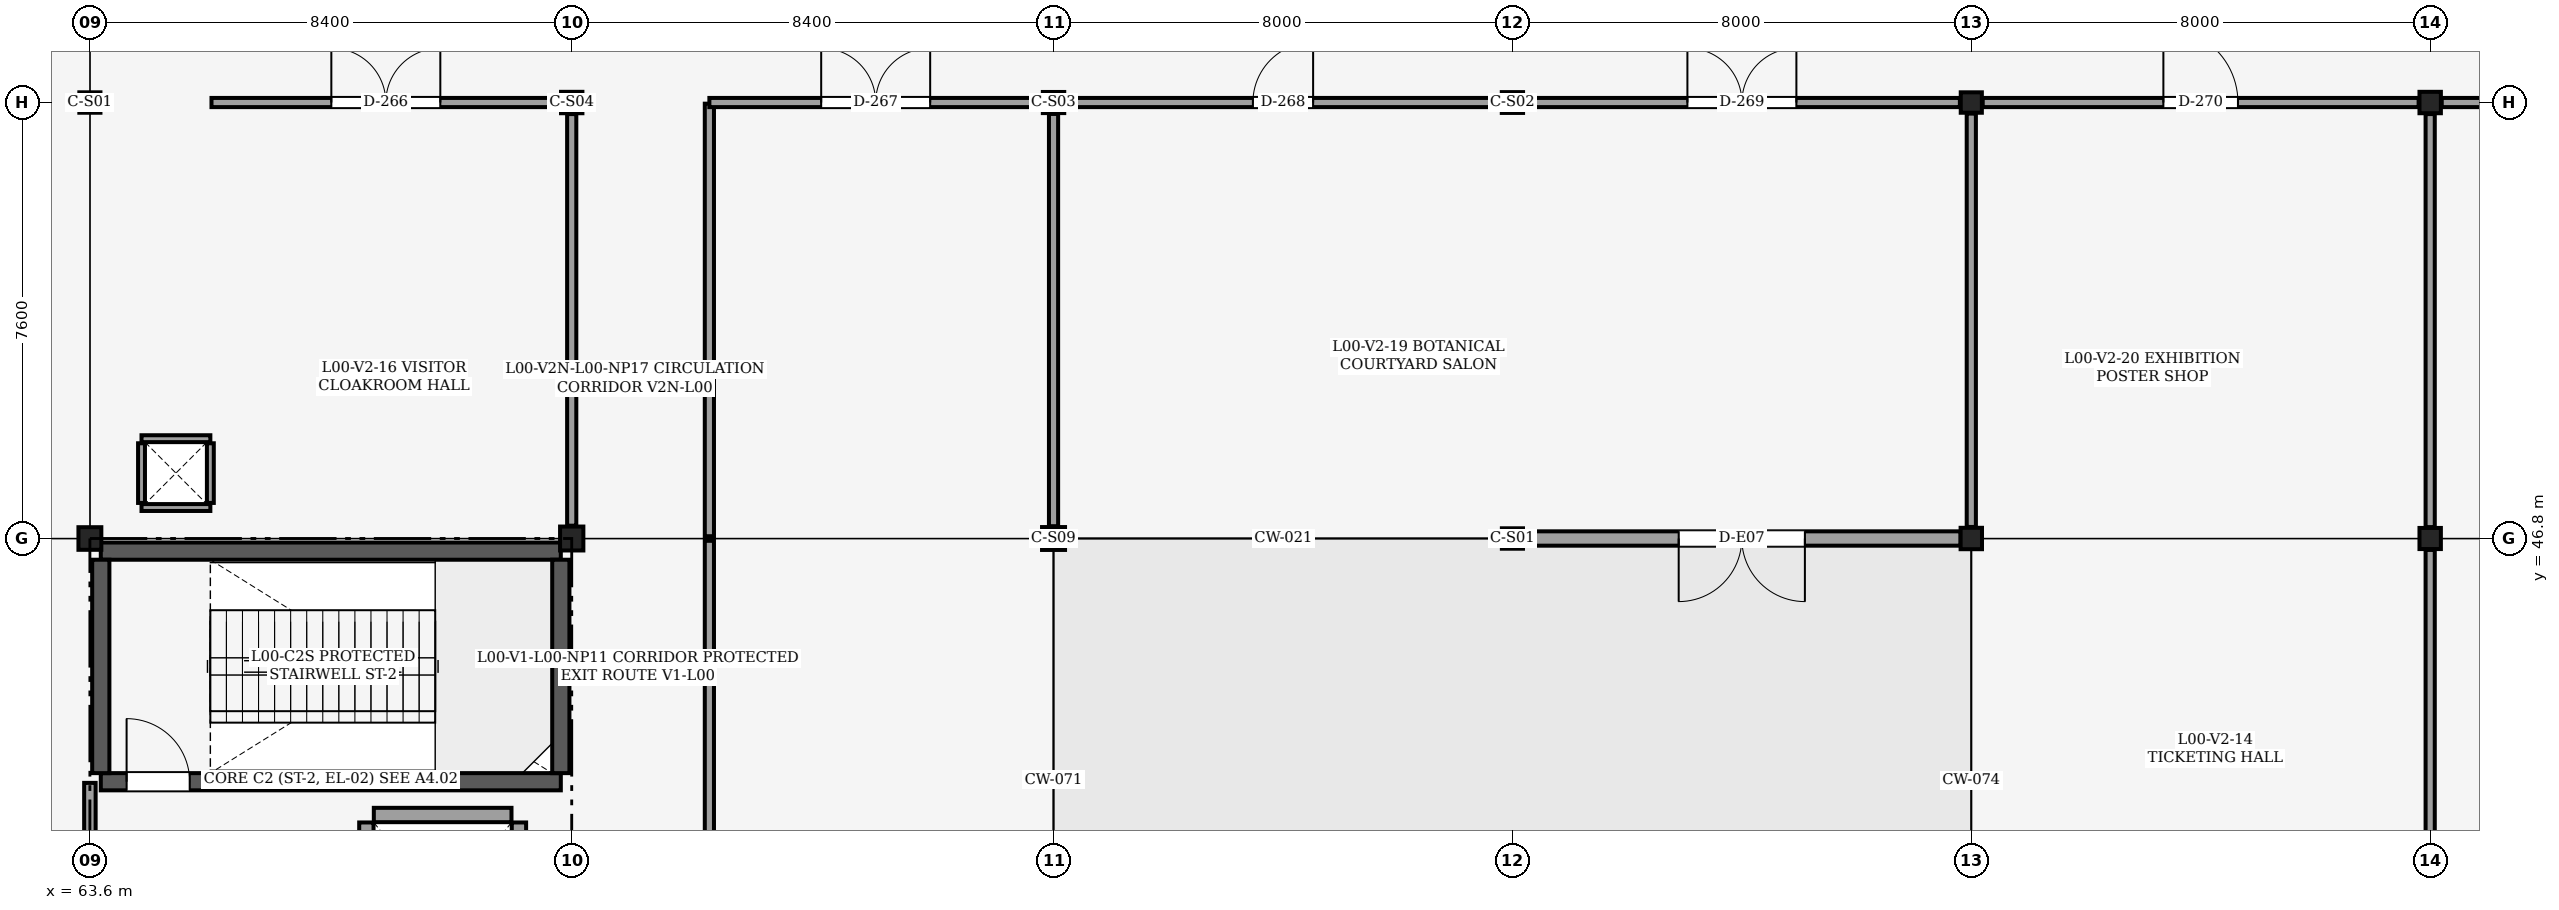
"""IFC4 building model, lengths in metres.
Left out: names, types, materials, properties, quantities, classifications, styles, units other than length and angle.
Written with IfcOpenShell. Run it as: python <this file> out.ifc"""

import sys

from ifc_helpers import new_model, si_unit, direction, frame, frame_2d, origin, origin_2d, place, context, subcontext, project, spatial, rectangle, i_section, extrude, element, fill, save


model = new_model("IFC4")
c1 = context("Model", 3, precision=1e-05, world=origin(), true_north=direction((0.0, 1.0)))
c2 = subcontext(c1, "Body", "Model", "MODEL_VIEW")
j1 = project(units=[si_unit("LENGTHUNIT", "METRE"), si_unit("PLANEANGLEUNIT", "RADIAN")], contexts=[c1])
p1 = place(None, origin())
s1 = spatial("IfcSite", under=j1, at=p1, CompositionType="ELEMENT")
p2 = place(p1, origin())
s2 = spatial("IfcBuilding", under=s1, at=p2, CompositionType="ELEMENT")
p3 = place(p2, origin())
s3 = spatial("IfcBuildingStorey", under=s2, at=p3, CompositionType="ELEMENT", Elevation=0.0)
p4 = place(p3, frame((63.6, 46.8, 0.0), z_axis=(0.0, 0.0, 1.0), x_axis=(1.0, 0.0, 0.0)))
e1 = element("IfcColumn", 1, at=p4, inside=s3, PredefinedType="COLUMN", context=c2, shape_type="SweptSolid", body=[
    extrude(i_section(OverallWidth=0.399, OverallDepth=0.394, WebThickness=0.023, FlangeThickness=0.037, FilletRadius=0.025, at=origin_2d()), origin(), (0.0, 0.0, 1.0), 5.4),
])
p5 = place(p3, frame((63.6, 54.4, 0.0), z_axis=(0.0, 0.0, 1.0), x_axis=(1.0, 0.0, 0.0)))
e2 = element("IfcColumn", 2, at=p5, inside=s3, PredefinedType="COLUMN", context=c2, shape_type="SweptSolid", body=[
    extrude(i_section(OverallWidth=0.368, OverallDepth=0.356, WebThickness=0.011, FlangeThickness=0.018, FilletRadius=0.025, at=origin_2d()), origin(), (0.0, 0.0, 1.0), 5.4),
])
p6 = place(p3, frame((72.0, 46.8, 0.0), z_axis=(0.0, 0.0, 1.0), x_axis=(1.0, 0.0, 0.0)))
e3 = element("IfcColumn", 3, at=p6, inside=s3, PredefinedType="COLUMN", context=c2, shape_type="SweptSolid", body=[
    extrude(i_section(OverallWidth=0.406, OverallDepth=0.417, WebThickness=0.03, FlangeThickness=0.048, FilletRadius=0.025, at=origin_2d()), origin(), (0.0, 0.0, 1.0), 5.4),
])
p7 = place(p3, frame((72.0, 54.4, 0.0), z_axis=(0.0, 0.0, 1.0), x_axis=(1.0, 0.0, 0.0)))
e4 = element("IfcColumn", 4, at=p7, inside=s3, PredefinedType="COLUMN", context=c2, shape_type="SweptSolid", body=[
    extrude(i_section(OverallWidth=0.373, OverallDepth=0.373, WebThickness=0.016, FlangeThickness=0.026, FilletRadius=0.025, at=origin_2d()), origin(), (0.0, 0.0, 1.0), 5.4),
])
p8 = place(p3, frame((80.4, 46.8, 0.0), z_axis=(0.0, 0.0, 1.0), x_axis=(1.0, 0.0, 0.0)))
e5 = element("IfcColumn", 5, at=p8, inside=s3, PredefinedType="COLUMN", context=c2, shape_type="SweptSolid", body=[
    extrude(i_section(OverallWidth=0.401, OverallDepth=0.399, WebThickness=0.025, FlangeThickness=0.04, FilletRadius=0.025, at=origin_2d()), origin(), (0.0, 0.0, 1.0), 5.4),
])
p9 = place(p3, frame((80.4, 54.4, 0.0), z_axis=(0.0, 0.0, 1.0), x_axis=(1.0, 0.0, 0.0)))
e6 = element("IfcColumn", 6, at=p9, inside=s3, PredefinedType="COLUMN", context=c2, shape_type="SweptSolid", body=[
    extrude(i_section(OverallWidth=0.373, OverallDepth=0.368, WebThickness=0.015, FlangeThickness=0.024, FilletRadius=0.025, at=origin_2d()), origin(), (0.0, 0.0, 1.0), 5.4),
])
p10 = place(p3, frame((88.4, 46.8, 0.0), z_axis=(0.0, 0.0, 1.0), x_axis=(1.0, 0.0, 0.0)))
e7 = element("IfcColumn", 7, at=p10, inside=s3, PredefinedType="COLUMN", context=c2, shape_type="SweptSolid", body=[
    extrude(i_section(OverallWidth=0.368, OverallDepth=0.356, WebThickness=0.011, FlangeThickness=0.018, FilletRadius=0.025, at=origin_2d()), origin(), (0.0, 0.0, 1.0), 5.4),
])
p11 = place(p3, frame((88.4, 54.4, 0.0), z_axis=(0.0, 0.0, 1.0), x_axis=(1.0, 0.0, 0.0)))
e8 = element("IfcColumn", 8, at=p11, inside=s3, PredefinedType="COLUMN", context=c2, shape_type="SweptSolid", body=[
    extrude(i_section(OverallWidth=0.371, OverallDepth=0.363, WebThickness=0.013, FlangeThickness=0.022, FilletRadius=0.025, at=origin_2d()), origin(), (0.0, 0.0, 1.0), 5.4),
])
p12 = place(p3, frame((96.4, 46.8, 0.0), z_axis=(0.0, 0.0, 1.0), x_axis=(1.0, 0.0, 0.0)))
e9 = element("IfcColumn", 9, at=p12, inside=s3, PredefinedType="COLUMN", context=c2, shape_type="SweptSolid", body=[
    extrude(i_section(OverallWidth=0.373, OverallDepth=0.373, WebThickness=0.016, FlangeThickness=0.026, FilletRadius=0.025, at=origin_2d()), origin(), (0.0, 0.0, 1.0), 5.4),
])
p13 = place(p3, frame((96.4, 54.4, 0.0), z_axis=(0.0, 0.0, 1.0), x_axis=(1.0, 0.0, 0.0)))
e10 = element("IfcColumn", 10, at=p13, inside=s3, PredefinedType="COLUMN", context=c2, shape_type="SweptSolid", body=[
    extrude(i_section(OverallWidth=0.368, OverallDepth=0.356, WebThickness=0.011, FlangeThickness=0.018, FilletRadius=0.025, at=origin_2d()), origin(), (0.0, 0.0, 1.0), 5.4),
])
p14 = place(p3, frame((104.4, 46.8, 0.0), z_axis=(0.0, 0.0, 1.0), x_axis=(1.0, 0.0, 0.0)))
e11 = element("IfcColumn", 11, at=p14, inside=s3, PredefinedType="COLUMN", context=c2, shape_type="SweptSolid", body=[
    extrude(i_section(OverallWidth=0.373, OverallDepth=0.368, WebThickness=0.015, FlangeThickness=0.024, FilletRadius=0.025, at=origin_2d()), origin(), (0.0, 0.0, 1.0), 5.4),
])
p15 = place(p3, frame((104.4, 54.4, 0.0), z_axis=(0.0, 0.0, 1.0), x_axis=(1.0, 0.0, 0.0)))
e12 = element("IfcColumn", 12, at=p15, inside=s3, PredefinedType="COLUMN", context=c2, shape_type="SweptSolid", body=[
    extrude(i_section(OverallWidth=0.373, OverallDepth=0.373, WebThickness=0.016, FlangeThickness=0.026, FilletRadius=0.025, at=origin_2d()), origin(), (0.0, 0.0, 1.0), 5.4),
])
p16 = place(p3, frame((96.213, 46.8, 0.0), z_axis=(0.0, 0.0, 1.0), x_axis=(-1.0, 0.0, 0.0)))
e13 = element("IfcWall", 13, at=p16, inside=s3, PredefinedType="SOLIDWALL", context=c2, shape_type="SweptSolid", body=[
    extrude(rectangle(XDim=7.629, YDim=0.25, at=frame_2d((3.815, 0.0))), origin(), (0.0, 0.0, 1.0), 4.678),
])
p17 = place(p16, frame((2.715, 0.0, 0.0)))
e14 = element("IfcOpeningElement", 14, at=p17, cuts=e13, PredefinedType="OPENING", context=c2, shape_type="SweptSolid", body=[
    extrude(rectangle(XDim=2.2, YDim=2.4, at=frame_2d((1.1, 1.2))), frame((0.0, 0.135, 0.0), z_axis=(0.0, -1.0, 0.0), x_axis=(1.0, 0.0, 0.0)), (0.0, 0.0, 1.0), 0.271),
])
p18 = place(p3, frame((63.79, 42.56, 0.0), z_axis=(0.0, 0.0, 1.0), x_axis=(1.0, 0.0, 0.0)))
e15 = element("IfcWall", 15, at=p18, inside=s3, PredefinedType="SHEAR", context=c2, shape_type="SweptSolid", body=[
    extrude(rectangle(XDim=8.02, YDim=0.3, at=frame_2d((4.01, 0.0))), origin(), (0.0, 0.0, 1.0), 5.16),
])
p19 = place(p18, frame((0.45, 0.0, 0.0)))
e16 = element("IfcOpeningElement", 16, at=p19, cuts=e15, PredefinedType="OPENING", context=c2, shape_type="SweptSolid", body=[
    extrude(rectangle(XDim=1.1, YDim=2.15, at=frame_2d((0.55, 1.075))), frame((0.0, 0.16, 0.0), z_axis=(0.0, -1.0, 0.0), x_axis=(1.0, 0.0, 0.0)), (0.0, 0.0, 1.0), 0.321),
])
p20 = place(p3, frame((63.79, 46.58, 0.0), z_axis=(0.0, 0.0, 1.0), x_axis=(1.0, 0.0, 0.0)))
e17 = element("IfcWall", 17, at=p20, inside=s3, PredefinedType="SHEAR", context=c2, shape_type="SweptSolid", body=[
    extrude(rectangle(XDim=8.02, YDim=0.3, at=frame_2d((4.01, 0.0))), origin(), (0.0, 0.0, 1.0), 5.16),
])
for number, where, z_axis, x_axis in (
    (18, (63.79, 42.71, 0.0), (0.0, 0.0, 1.0), (0.0, 1.0, 0.0)),
    (19, (71.81, 42.71, 0.0), (0.0, 0.0, 1.0), (0.0, 1.0, 0.0)),
):
    element("IfcWall", number, at=place(p3, frame(where, z_axis=z_axis, x_axis=x_axis)), inside=s3, PredefinedType="SHEAR", context=c2, shape_type="SweptSolid", body=[
        extrude(rectangle(XDim=3.72, YDim=0.3, at=frame_2d((1.86, 0.0))), origin(), (0.0, 0.0, 1.0), 5.16),
    ])
p21 = place(p3, frame((71.08, 38.85, 0.0), z_axis=(0.0, 0.0, 1.0), x_axis=(0.0, 1.0, 0.0)))
e20 = element("IfcWall", 20, at=p21, inside=s3, PredefinedType="PARTITIONING", context=c2, shape_type="SweptSolid", body=[
    extrude(rectangle(XDim=3.0, YDim=0.25, at=frame_2d((1.5, 0.0))), origin(), (0.0, 0.0, 1.0), 5.16),
])
p22 = place(p3, frame((68.55, 41.98, 0.0), z_axis=(0.0, 0.0, 1.0), x_axis=(1.0, 0.0, 0.0)))
e21 = element("IfcWall", 21, at=p22, inside=s3, PredefinedType="PARTITIONING", context=c2, shape_type="SweptSolid", body=[
    extrude(rectangle(XDim=2.4, YDim=0.25, at=frame_2d((1.2, 0.0))), origin(), (0.0, 0.0, 1.0), 5.16),
])
p23 = place(p3, frame((68.42, 38.5, 0.0), z_axis=(0.0, 0.0, 1.0), x_axis=(0.0, 1.0, 0.0)))
e22 = element("IfcWall", 22, at=p23, inside=s3, PredefinedType="PARTITIONING", context=c2, shape_type="SweptSolid", body=[
    extrude(rectangle(XDim=3.35, YDim=0.25, at=frame_2d((1.675, 0.0))), origin(), (0.0, 0.0, 1.0), 5.16),
])
p24 = place(p23, frame((0.85, 0.0, 0.0)))
e23 = element("IfcOpeningElement", 23, at=p24, cuts=e22, PredefinedType="OPENING", context=c2, shape_type="SweptSolid", body=[
    extrude(rectangle(XDim=1.25, YDim=2.15, at=frame_2d((0.625, 1.075))), frame((0.0, 0.135, 0.0), z_axis=(0.0, -1.0, 0.0), x_axis=(1.0, 0.0, 0.0)), (0.0, 0.0, 1.0), 0.271),
])
p25 = place(p3, frame((63.6, 38.62, 0.0), z_axis=(0.0, 0.0, 1.0), x_axis=(0.0, 1.0, 0.0)))
e24 = element("IfcWall", 24, at=p25, inside=s3, PredefinedType="PARTITIONING", context=c2, shape_type="SweptSolid", body=[
    extrude(rectangle(XDim=3.92, YDim=0.2, at=frame_2d((1.96, 0.0))), origin(), (0.0, 0.0, 1.0), 4.447),
])
for number, where, z_axis, x_axis in (
    (25, (64.5, 47.34, 0.0), (0.0, 0.0, 1.0), (1.0, 0.0, 0.0)),
    (26, (64.5, 48.54, 0.0), (0.0, 0.0, 1.0), (1.0, 0.0, 0.0)),
):
    element("IfcWall", number, at=place(p3, frame(where, z_axis=z_axis, x_axis=x_axis)), inside=s3, PredefinedType="PARTITIONING", context=c2, shape_type="SweptSolid", body=[
        extrude(rectangle(XDim=1.2, YDim=0.12, at=frame_2d((0.6, 0.0))), origin(), (0.0, 0.0, 1.0), 5.16),
    ])
for number, where, z_axis, x_axis in (
    (27, (64.5, 47.42, 0.0), (0.0, 0.0, 1.0), (0.0, 1.0, 0.0)),
    (28, (65.7, 47.42, 0.0), (0.0, 0.0, 1.0), (0.0, 1.0, 0.0)),
):
    element("IfcWall", number, at=place(p3, frame(where, z_axis=z_axis, x_axis=x_axis)), inside=s3, PredefinedType="PARTITIONING", context=c2, shape_type="SweptSolid", body=[
        extrude(rectangle(XDim=1.04, YDim=0.12, at=frame_2d((0.52, 0.0))), origin(), (0.0, 0.0, 1.0), 5.16),
    ])
p26 = place(p3, frame((74.4, 38.42, 0.0), z_axis=(0.0, 0.0, 1.0), x_axis=(0.0, 1.0, 0.0)))
e29 = element("IfcWall", 29, at=p26, inside=s3, PredefinedType="PARTITIONING", context=c2, shape_type="SweptSolid", body=[
    extrude(rectangle(XDim=8.34, YDim=0.16, at=frame_2d((4.17, 0.0))), origin(), (0.0, 0.0, 1.0), 5.14),
])
p27 = place(p3, frame((104.4, 38.567, 0.0), z_axis=(0.0, 0.0, 1.0), x_axis=(0.0, 1.0, 0.0)))
e30 = element("IfcWall", 30, at=p27, inside=s3, PredefinedType="PARTITIONING", context=c2, shape_type="SweptSolid", body=[
    extrude(rectangle(XDim=8.034, YDim=0.16, at=frame_2d((4.017, 0.0))), origin(), (0.0, 0.0, 1.0), 4.368),
])
p28 = place(p3, frame((65.72, 54.4, 0.0), z_axis=(0.0, 0.0, 1.0), x_axis=(1.0, 0.0, 0.0)))
e31 = element("IfcWall", 31, at=p28, inside=s3, PredefinedType="PARTITIONING", context=c2, shape_type="SweptSolid", body=[
    extrude(rectangle(XDim=6.079, YDim=0.16, at=frame_2d((3.039, 0.0))), origin(), (0.0, 0.0, 1.0), 4.518),
])
p29 = place(p28, frame((2.089, 0.0, 0.0)))
e32 = element("IfcOpeningElement", 32, at=p29, cuts=e31, PredefinedType="OPENING", context=c2, shape_type="SweptSolid", body=[
    extrude(rectangle(XDim=1.9, YDim=2.45, at=frame_2d((0.95, 1.225))), frame((0.0, 0.09, 0.0), z_axis=(0.0, -1.0, 0.0), x_axis=(1.0, 0.0, 0.0)), (0.0, 0.0, 1.0), 0.18),
])
p30 = place(p3, frame((72.0, 47.023, 0.0), z_axis=(0.0, 0.0, 1.0), x_axis=(0.0, 1.0, 0.0)))
e33 = element("IfcWall", 33, at=p30, inside=s3, PredefinedType="PARTITIONING", context=c2, shape_type="SweptSolid", body=[
    extrude(rectangle(XDim=7.175, YDim=0.16, at=frame_2d((3.587, 0.0))), origin(), (0.0, 0.0, 1.0), 4.533),
])
p31 = place(p3, frame((74.4, 46.84, 0.0), z_axis=(0.0, 0.0, 1.0), x_axis=(0.0, 1.0, 0.0)))
e34 = element("IfcWall", 34, at=p31, inside=s3, PredefinedType="PARTITIONING", context=c2, shape_type="SweptSolid", body=[
    extrude(rectangle(XDim=7.54, YDim=0.16, at=frame_2d((3.77, 0.0))), origin(), (0.0, 0.0, 1.0), 5.14),
])
p32 = place(p3, frame((74.4, 54.4, 0.0), z_axis=(0.0, 0.0, 1.0), x_axis=(1.0, 0.0, 0.0)))
e35 = element("IfcWall", 35, at=p32, inside=s3, PredefinedType="PARTITIONING", context=c2, shape_type="SweptSolid", body=[
    extrude(rectangle(XDim=5.799, YDim=0.16, at=frame_2d((2.899, 0.0))), origin(), (0.0, 0.0, 1.0), 4.528),
])
p33 = place(p32, frame((1.949, 0.0, 0.0)))
e36 = element("IfcOpeningElement", 36, at=p33, cuts=e35, PredefinedType="OPENING", context=c2, shape_type="SweptSolid", body=[
    extrude(rectangle(XDim=1.9, YDim=2.45, at=frame_2d((0.95, 1.225))), frame((0.0, 0.09, 0.0), z_axis=(0.0, -1.0, 0.0), x_axis=(1.0, 0.0, 0.0)), (0.0, 0.0, 1.0), 0.18),
])
p34 = place(p3, frame((80.4, 47.014, 0.0), z_axis=(0.0, 0.0, 1.0), x_axis=(0.0, 1.0, 0.0)))
e37 = element("IfcWall", 37, at=p34, inside=s3, PredefinedType="PARTITIONING", context=c2, shape_type="SweptSolid", body=[
    extrude(rectangle(XDim=7.187, YDim=0.16, at=frame_2d((3.593, 0.0))), origin(), (0.0, 0.0, 1.0), 4.607),
])
p35 = place(p3, frame((80.602, 54.4, 0.0), z_axis=(0.0, 0.0, 1.0), x_axis=(1.0, 0.0, 0.0)))
e38 = element("IfcWall", 38, at=p35, inside=s3, PredefinedType="PARTITIONING", context=c2, shape_type="SweptSolid", body=[
    extrude(rectangle(XDim=7.598, YDim=0.16, at=frame_2d((3.799, 0.0))), origin(), (0.0, 0.0, 1.0), 4.678),
])
p36 = place(p35, frame((3.274, 0.0, 0.0)))
e39 = element("IfcOpeningElement", 39, at=p36, cuts=e38, PredefinedType="OPENING", context=c2, shape_type="SweptSolid", body=[
    extrude(rectangle(XDim=1.05, YDim=2.15, at=frame_2d((0.525, 1.075))), frame((0.0, 0.09, 0.0), z_axis=(0.0, -1.0, 0.0), x_axis=(1.0, 0.0, 0.0)), (0.0, 0.0, 1.0), 0.18),
])
p37 = place(p3, frame((88.601, 54.4, 0.0), z_axis=(0.0, 0.0, 1.0), x_axis=(1.0, 0.0, 0.0)))
e40 = element("IfcWall", 40, at=p37, inside=s3, PredefinedType="PARTITIONING", context=c2, shape_type="SweptSolid", body=[
    extrude(rectangle(XDim=7.6, YDim=0.16, at=frame_2d((3.8, 0.0))), origin(), (0.0, 0.0, 1.0), 4.533),
])
p38 = place(p37, frame((2.85, 0.0, 0.0)))
e41 = element("IfcOpeningElement", 41, at=p38, cuts=e40, PredefinedType="OPENING", context=c2, shape_type="SweptSolid", body=[
    extrude(rectangle(XDim=1.9, YDim=2.45, at=frame_2d((0.95, 1.225))), frame((0.0, 0.09, 0.0), z_axis=(0.0, -1.0, 0.0), x_axis=(1.0, 0.0, 0.0)), (0.0, 0.0, 1.0), 0.18),
])
p39 = place(p3, frame((96.4, 47.001, 0.0), z_axis=(0.0, 0.0, 1.0), x_axis=(0.0, 1.0, 0.0)))
e42 = element("IfcWall", 42, at=p39, inside=s3, PredefinedType="PARTITIONING", context=c2, shape_type="SweptSolid", body=[
    extrude(rectangle(XDim=7.206, YDim=0.16, at=frame_2d((3.603, 0.0))), origin(), (0.0, 0.0, 1.0), 4.528),
])
p40 = place(p3, frame((96.599, 54.4, 0.0), z_axis=(0.0, 0.0, 1.0), x_axis=(1.0, 0.0, 0.0)))
e43 = element("IfcWall", 43, at=p40, inside=s3, PredefinedType="PARTITIONING", context=c2, shape_type="SweptSolid", body=[
    extrude(rectangle(XDim=7.599, YDim=0.16, at=frame_2d((3.8, 0.0))), origin(), (0.0, 0.0, 1.0), 4.591),
])
p41 = place(p40, frame((3.15, 0.0, 0.0)))
e44 = element("IfcOpeningElement", 44, at=p41, cuts=e43, PredefinedType="OPENING", context=c2, shape_type="SweptSolid", body=[
    extrude(rectangle(XDim=1.3, YDim=2.2, at=frame_2d((0.65, 1.1))), frame((0.0, 0.09, 0.0), z_axis=(0.0, -1.0, 0.0), x_axis=(1.0, 0.0, 0.0)), (0.0, 0.0, 1.0), 0.18),
])
p42 = place(p3, frame((104.4, 46.999, 0.0), z_axis=(0.0, 0.0, 1.0), x_axis=(0.0, 1.0, 0.0)))
e45 = element("IfcWall", 45, at=p42, inside=s3, PredefinedType="PARTITIONING", context=c2, shape_type="SweptSolid", body=[
    extrude(rectangle(XDim=7.199, YDim=0.16, at=frame_2d((3.6, 0.0))), origin(), (0.0, 0.0, 1.0), 4.533),
])
p43 = place(p3, frame((104.602, 54.4, 0.0), z_axis=(0.0, 0.0, 1.0), x_axis=(1.0, 0.0, 0.0)))
e46 = element("IfcWall", 46, at=p43, inside=s3, PredefinedType="PARTITIONING", context=c2, shape_type="SweptSolid", body=[
    extrude(rectangle(XDim=7.985, YDim=0.16, at=frame_2d((3.993, 0.0))), origin(), (0.0, 0.0, 1.0), 4.508),
])
p44 = place(p43, frame((3.043, 0.0, 0.0)))
e47 = element("IfcOpeningElement", 47, at=p44, cuts=e46, PredefinedType="OPENING", context=c2, shape_type="SweptSolid", body=[
    extrude(rectangle(XDim=1.9, YDim=2.45, at=frame_2d((0.95, 1.225))), frame((0.0, 0.09, 0.0), z_axis=(0.0, -1.0, 0.0), x_axis=(1.0, 0.0, 0.0)), (0.0, 0.0, 1.0), 0.18),
])
p45 = place(p17, origin())
e48 = element("IfcDoor", 48, at=p45, inside=s3, OperationType="DOUBLE_DOOR_SINGLE_SWING", PredefinedType="DOOR", context=c2, shape_type="SweptSolid", body=[
    extrude(rectangle(XDim=2.2, YDim=2.4, at=frame_2d((1.1, 1.2))), frame((0.0, 0.025, 0.0), z_axis=(0.0, -1.0, 0.0), x_axis=(1.0, 0.0, 0.0)), (0.0, 0.0, 1.0), 0.05),
])
fill(e14, e48)
p46 = place(p19, origin())
e49 = element("IfcDoor", 49, at=p46, inside=s3, OperationType="SINGLE_SWING_LEFT", PredefinedType="DOOR", context=c2, shape_type="SweptSolid", body=[
    extrude(rectangle(XDim=1.1, YDim=2.15, at=frame_2d((0.55, 1.075))), frame((0.0, 0.025, 0.0), z_axis=(0.0, -1.0, 0.0), x_axis=(1.0, 0.0, 0.0)), (0.0, 0.0, 1.0), 0.05),
])
fill(e16, e49)
p47 = place(p29, origin())
e50 = element("IfcDoor", 50, at=p47, inside=s3, OperationType="DOUBLE_DOOR_SINGLE_SWING", PredefinedType="DOOR", context=c2, shape_type="SweptSolid", body=[
    extrude(rectangle(XDim=1.9, YDim=2.45, at=frame_2d((0.95, 1.225))), frame((0.0, 0.025, 0.0), z_axis=(0.0, -1.0, 0.0), x_axis=(1.0, 0.0, 0.0)), (0.0, 0.0, 1.0), 0.05),
])
fill(e32, e50)
p48 = place(p33, origin())
e51 = element("IfcDoor", 51, at=p48, inside=s3, OperationType="DOUBLE_DOOR_SINGLE_SWING", PredefinedType="DOOR", context=c2, shape_type="SweptSolid", body=[
    extrude(rectangle(XDim=1.9, YDim=2.45, at=frame_2d((0.95, 1.225))), frame((0.0, 0.025, 0.0), z_axis=(0.0, -1.0, 0.0), x_axis=(1.0, 0.0, 0.0)), (0.0, 0.0, 1.0), 0.05),
])
fill(e36, e51)
p49 = place(p36, origin())
e52 = element("IfcDoor", 52, at=p49, inside=s3, OperationType="SINGLE_SWING_RIGHT", PredefinedType="DOOR", context=c2, shape_type="SweptSolid", body=[
    extrude(rectangle(XDim=1.05, YDim=2.15, at=frame_2d((0.525, 1.075))), frame((0.0, 0.025, 0.0), z_axis=(0.0, -1.0, 0.0), x_axis=(1.0, 0.0, 0.0)), (0.0, 0.0, 1.0), 0.05),
])
fill(e39, e52)
p50 = place(p38, origin())
e53 = element("IfcDoor", 53, at=p50, inside=s3, OperationType="DOUBLE_DOOR_SINGLE_SWING", PredefinedType="DOOR", context=c2, shape_type="SweptSolid", body=[
    extrude(rectangle(XDim=1.9, YDim=2.45, at=frame_2d((0.95, 1.225))), frame((0.0, 0.025, 0.0), z_axis=(0.0, -1.0, 0.0), x_axis=(1.0, 0.0, 0.0)), (0.0, 0.0, 1.0), 0.05),
])
fill(e41, e53)
p51 = place(p41, origin())
e54 = element("IfcDoor", 54, at=p51, inside=s3, OperationType="SINGLE_SWING_LEFT", PredefinedType="DOOR", context=c2, shape_type="SweptSolid", body=[
    extrude(rectangle(XDim=1.3, YDim=2.2, at=frame_2d((0.65, 1.1))), frame((0.0, 0.025, 0.0), z_axis=(0.0, -1.0, 0.0), x_axis=(1.0, 0.0, 0.0)), (0.0, 0.0, 1.0), 0.05),
])
fill(e44, e54)
save(model, sys.argv[1])
